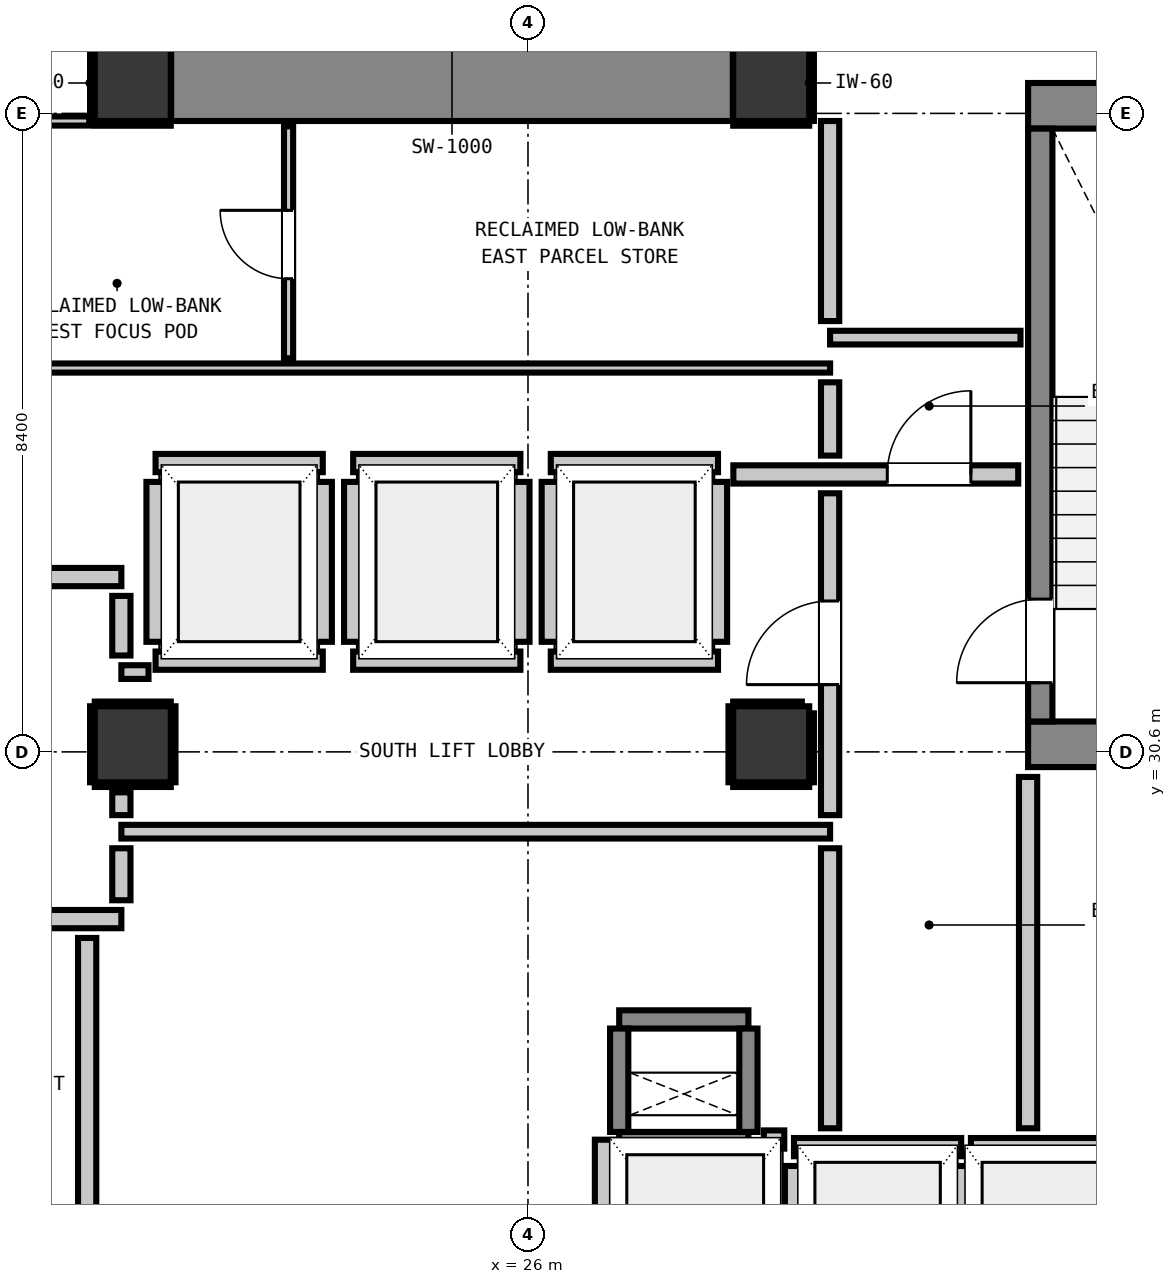
"""IFC4 building model, lengths in metres.
Left out: names, types, materials, properties, quantities, classifications, styles, units other than length and angle.
Written with IfcOpenShell. Run it as: python <this file> out.ifc"""

import sys

from ifc_helpers import new_model, si_unit, direction, frame, frame_2d, origin, origin_2d, place, context, subcontext, project, spatial, rectangle, extrude, element, fill, save


model = new_model("IFC4")
c1 = context("Model", 3, precision=1e-05, world=origin(), true_north=direction((0.0, 1.0)))
c2 = subcontext(c1, "Body", "Model", "MODEL_VIEW")
j1 = project(units=[si_unit("LENGTHUNIT", "METRE"), si_unit("PLANEANGLEUNIT", "RADIAN")], contexts=[c1])
p1 = place(None, origin())
s1 = spatial("IfcSite", under=j1, at=p1, CompositionType="ELEMENT")
p2 = place(p1, origin())
s2 = spatial("IfcBuilding", under=s1, at=p2, CompositionType="ELEMENT")
p3 = place(p2, frame((0.0, 0.0, 102.76)))
s3 = spatial("IfcBuildingStorey", under=s2, at=p3, CompositionType="ELEMENT", Elevation=102.76)
for number, where, z_axis, x_axis in (
    (1, (20.8, 39.4, 0.0), (0.0, 0.0, 1.0), (1.0, 0.0, 0.0)),
    (2, (29.2, 39.4, 0.0), (0.0, 0.0, 1.0), (1.0, 0.0, 0.0)),
):
    element("IfcColumn", number, at=place(p3, frame(where, z_axis=z_axis, x_axis=x_axis)), inside=s3, PredefinedType="COLUMN", context=c2, shape_type="SweptSolid", body=[
        extrude(rectangle(XDim=1.0, YDim=1.0, at=origin_2d()), origin(), (0.0, 0.0, 1.0), 3.32),
    ])
p4 = place(p3, frame((32.58, 39.1, 0.0), z_axis=(0.0, 0.0, 1.0), x_axis=(1.0, 0.0, 0.0)))
e3 = element("IfcWall", 3, at=p4, inside=s3, PredefinedType="SHEAR", context=c2, shape_type="SweptSolid", body=[
    extrude(rectangle(XDim=4.08, YDim=0.6, at=frame_2d((2.04, 0.0))), origin(), (0.0, 0.0, 1.0), 3.32),
])
p5 = place(p3, frame((32.58, 30.7, 0.0), z_axis=(0.0, 0.0, 1.0), x_axis=(1.0, 0.0, 0.0)))
e4 = element("IfcWall", 4, at=p5, inside=s3, PredefinedType="SHEAR", context=c2, shape_type="SweptSolid", body=[
    extrude(rectangle(XDim=3.415, YDim=0.6, at=frame_2d((1.708, 0.0))), origin(), (0.0, 0.0, 1.0), 3.32),
])
p6 = place(p3, frame((21.305, 39.4, 0.0), z_axis=(0.0, 0.0, 1.0), x_axis=(1.0, 0.0, 0.0)))
e5 = element("IfcWall", 5, at=p6, inside=s3, PredefinedType="SHEAR", context=c2, shape_type="SweptSolid", body=[
    extrude(rectangle(XDim=7.39, YDim=1.0, at=frame_2d((3.695, 0.0))), origin(), (0.0, 0.0, 1.0), 3.32),
])
p7 = place(p3, frame((32.74, 31.0, 0.0), z_axis=(0.0, 0.0, 1.0), x_axis=(0.0, 1.0, 0.0)))
e6 = element("IfcWall", 6, at=p7, inside=s3, PredefinedType="SHEAR", context=c2, shape_type="SweptSolid", body=[
    extrude(rectangle(XDim=7.8, YDim=0.32, at=frame_2d((3.9, 0.0))), origin(), (0.0, 0.0, 1.0), 3.32),
])
p8 = place(p7, frame((0.51, 0.0, 0.0)))
e7 = element("IfcOpeningElement", 7, at=p8, cuts=e6, PredefinedType="OPENING", context=c2, shape_type="SweptSolid", body=[
    extrude(rectangle(XDim=1.1, YDim=2.15, at=frame_2d((0.55, 1.075))), frame((0.0, 0.17, 0.0), z_axis=(0.0, -1.0, 0.0), x_axis=(1.0, 0.0, 0.0)), (0.0, 0.0, 1.0), 0.34),
])
for number, where, z_axis, x_axis in (
    (8, (27.2, 25.48, 0.0), (0.0, 0.0, 1.0), (1.0, 0.0, 0.0)),
    (9, (27.2, 27.08, 0.0), (0.0, 0.0, 1.0), (1.0, 0.0, 0.0)),
):
    element("IfcWall", number, at=place(p3, frame(where, z_axis=z_axis, x_axis=x_axis)), inside=s3, PredefinedType="SHEAR", context=c2, shape_type="SweptSolid", body=[
        extrude(rectangle(XDim=1.7, YDim=0.24, at=frame_2d((0.85, 0.0))), origin(), (0.0, 0.0, 1.0), 3.32),
    ])
for number, where, z_axis, x_axis in (
    (10, (27.2, 25.6, 0.0), (0.0, 0.0, 1.0), (0.0, 1.0, 0.0)),
    (11, (28.9, 25.6, 0.0), (0.0, 0.0, 1.0), (0.0, 1.0, 0.0)),
):
    element("IfcWall", number, at=place(p3, frame(where, z_axis=z_axis, x_axis=x_axis)), inside=s3, PredefinedType="SHEAR", context=c2, shape_type="SweptSolid", body=[
        extrude(rectangle(XDim=1.36, YDim=0.24, at=frame_2d((0.68, 0.0))), origin(), (0.0, 0.0, 1.0), 3.32),
    ])
for number, where, z_axis, x_axis in (
    (12, (20.8, 30.7, 0.0), (0.0, 0.0, 1.0), (1.0, 0.0, 0.0)),
    (13, (29.2, 30.7, 0.0), (0.0, 0.0, 1.0), (1.0, 0.0, 0.0)),
):
    element("IfcColumn", number, at=place(p3, frame(where, z_axis=z_axis, x_axis=x_axis)), inside=s3, PredefinedType="COLUMN", context=c2, shape_type="SweptSolid", body=[
        extrude(rectangle(XDim=1.0, YDim=1.0, at=origin_2d()), origin(), (0.0, 0.0, 1.0), 3.32),
    ])
for number, where, z_axis, x_axis in (
    (14, (21.1, 31.8, 0.0), (0.0, 0.0, 1.0), (1.0, 0.0, 0.0)),
    (15, (21.1, 34.4, 0.0), (0.0, 0.0, 1.0), (1.0, 0.0, 0.0)),
):
    element("IfcWall", number, at=place(p3, frame(where, z_axis=z_axis, x_axis=x_axis)), inside=s3, PredefinedType="PARTITIONING", context=c2, shape_type="SweptSolid", body=[
        extrude(rectangle(XDim=2.2, YDim=0.24, at=frame_2d((1.1, 0.0))), origin(), (0.0, 0.0, 1.0), 2.9),
    ])
p9 = place(p3, frame((21.1, 32.048, 0.0), z_axis=(0.0, 0.0, 1.0), x_axis=(0.0, 1.0, 0.0)))
e16 = element("IfcWall", 16, at=p9, inside=s3, PredefinedType="PARTITIONING", context=c2, shape_type="SweptSolid", body=[
    extrude(rectangle(XDim=2.104, YDim=0.24, at=frame_2d((1.052, 0.0))), origin(), (0.0, 0.0, 1.0), 0.905),
])
p10 = place(p3, frame((23.3, 32.048, 0.0), z_axis=(0.0, 0.0, 1.0), x_axis=(0.0, 1.0, 0.0)))
e17 = element("IfcWall", 17, at=p10, inside=s3, PredefinedType="PARTITIONING", context=c2, shape_type="SweptSolid", body=[
    extrude(rectangle(XDim=2.104, YDim=0.24, at=frame_2d((1.052, 0.0))), origin(), (0.0, 0.0, 1.0), 2.9),
])
for number, where, z_axis, x_axis in (
    (18, (23.7, 31.8, 0.0), (0.0, 0.0, 1.0), (1.0, 0.0, 0.0)),
    (19, (23.7, 34.4, 0.0), (0.0, 0.0, 1.0), (1.0, 0.0, 0.0)),
):
    element("IfcWall", number, at=place(p3, frame(where, z_axis=z_axis, x_axis=x_axis)), inside=s3, PredefinedType="PARTITIONING", context=c2, shape_type="SweptSolid", body=[
        extrude(rectangle(XDim=2.2, YDim=0.24, at=frame_2d((1.1, 0.0))), origin(), (0.0, 0.0, 1.0), 2.9),
    ])
for number, where, z_axis, x_axis in (
    (20, (23.7, 32.048, 0.0), (0.0, 0.0, 1.0), (0.0, 1.0, 0.0)),
    (21, (25.9, 32.048, 0.0), (0.0, 0.0, 1.0), (0.0, 1.0, 0.0)),
):
    element("IfcWall", number, at=place(p3, frame(where, z_axis=z_axis, x_axis=x_axis)), inside=s3, PredefinedType="PARTITIONING", context=c2, shape_type="SweptSolid", body=[
        extrude(rectangle(XDim=2.104, YDim=0.24, at=frame_2d((1.052, 0.0))), origin(), (0.0, 0.0, 1.0), 2.9),
    ])
for number, where, z_axis, x_axis in (
    (22, (26.3, 31.8, 0.0), (0.0, 0.0, 1.0), (1.0, 0.0, 0.0)),
    (23, (26.3, 34.4, 0.0), (0.0, 0.0, 1.0), (1.0, 0.0, 0.0)),
):
    element("IfcWall", number, at=place(p3, frame(where, z_axis=z_axis, x_axis=x_axis)), inside=s3, PredefinedType="PARTITIONING", context=c2, shape_type="SweptSolid", body=[
        extrude(rectangle(XDim=2.2, YDim=0.24, at=frame_2d((1.1, 0.0))), origin(), (0.0, 0.0, 1.0), 2.9),
    ])
p11 = place(p3, frame((26.3, 32.048, 0.0), z_axis=(0.0, 0.0, 1.0), x_axis=(0.0, 1.0, 0.0)))
e24 = element("IfcWall", 24, at=p11, inside=s3, PredefinedType="PARTITIONING", context=c2, shape_type="SweptSolid", body=[
    extrude(rectangle(XDim=2.104, YDim=0.24, at=frame_2d((1.052, 0.0))), origin(), (0.0, 0.0, 1.0), 2.9),
])
p12 = place(p3, frame((28.5, 32.048, 0.0), z_axis=(0.0, 0.0, 1.0), x_axis=(0.0, 1.0, 0.0)))
e25 = element("IfcWall", 25, at=p12, inside=s3, PredefinedType="PARTITIONING", context=c2, shape_type="SweptSolid", body=[
    extrude(rectangle(XDim=2.104, YDim=0.24, at=frame_2d((1.052, 0.0))), origin(), (0.0, 0.0, 1.0), 0.905),
])
p13 = place(p3, frame((29.5, 25.4, 0.0), z_axis=(0.0, 0.0, 1.0), x_axis=(1.0, 0.0, 0.0)))
e26 = element("IfcWall", 26, at=p13, inside=s3, PredefinedType="PARTITIONING", context=c2, shape_type="SweptSolid", body=[
    extrude(rectangle(XDim=2.2, YDim=0.24, at=frame_2d((1.1, 0.0))), origin(), (0.0, 0.0, 1.0), 2.9),
])
p14 = place(p3, frame((29.5, 22.632, 0.0), z_axis=(0.0, 0.0, 1.0), x_axis=(0.0, 1.0, 0.0)))
e27 = element("IfcWall", 27, at=p14, inside=s3, PredefinedType="PARTITIONING", context=c2, shape_type="SweptSolid", body=[
    extrude(rectangle(XDim=2.52, YDim=0.24, at=frame_2d((1.26, 0.0))), origin(), (0.0, 0.0, 1.0), 0.905),
])
p15 = place(p3, frame((31.7, 22.63, 0.0), z_axis=(0.0, 0.0, 1.0), x_axis=(0.0, 1.0, 0.0)))
e28 = element("IfcWall", 28, at=p15, inside=s3, PredefinedType="PARTITIONING", context=c2, shape_type="SweptSolid", body=[
    extrude(rectangle(XDim=2.522, YDim=0.24, at=frame_2d((1.261, 0.0))), origin(), (0.0, 0.0, 1.0), 2.9),
])
p16 = place(p3, frame((31.828, 25.4, 0.0), z_axis=(0.0, 0.0, 1.0), x_axis=(1.0, 0.0, 0.0)))
e29 = element("IfcWall", 29, at=p16, inside=s3, PredefinedType="PARTITIONING", context=c2, shape_type="SweptSolid", body=[
    extrude(rectangle(XDim=2.072, YDim=0.24, at=frame_2d((1.036, 0.0))), origin(), (0.0, 0.0, 1.0), 2.9),
])
p17 = place(p3, frame((29.103, 25.5, 0.0), z_axis=(0.0, 0.0, 1.0), x_axis=(1.0, 0.0, 0.0)))
e30 = element("IfcWall", 30, at=p17, inside=s3, PredefinedType="PARTITIONING", context=c2, shape_type="SweptSolid", body=[
    extrude(rectangle(XDim=0.269, YDim=0.24, at=frame_2d((0.135, 0.0))), origin(), (0.0, 0.0, 1.0), 2.9),
])
p18 = place(p3, frame((27.0, 22.63, 0.0), z_axis=(0.0, 0.0, 1.0), x_axis=(0.0, 1.0, 0.0)))
e31 = element("IfcWall", 31, at=p18, inside=s3, PredefinedType="PARTITIONING", context=c2, shape_type="SweptSolid", body=[
    extrude(rectangle(XDim=2.868, YDim=0.24, at=frame_2d((1.434, 0.0))), origin(), (0.0, 0.0, 1.0), 2.9),
])
p19 = place(p3, frame((17.45, 28.4, 0.0), z_axis=(0.0, 0.0, 1.0), x_axis=(1.0, 0.0, 0.0)))
e32 = element("IfcWall", 32, at=p19, inside=s3, PredefinedType="PARTITIONING", context=c2, shape_type="SweptSolid", body=[
    extrude(rectangle(XDim=3.2, YDim=0.24, at=frame_2d((1.6, 0.0))), origin(), (0.0, 0.0, 1.0), 2.9),
])
p20 = place(p19, frame((0.784, 0.0, 0.0)))
e33 = element("IfcOpeningElement", 33, at=p20, cuts=e32, PredefinedType="OPENING", context=c2, shape_type="SweptSolid", body=[
    extrude(rectangle(XDim=1.1, YDim=2.15, at=frame_2d((0.55, 1.075))), frame((0.0, 0.13, 0.0), z_axis=(0.0, -1.0, 0.0), x_axis=(1.0, 0.0, 0.0)), (0.0, 0.0, 1.0), 0.26),
])
p21 = place(p3, frame((17.45, 32.9, 0.0), z_axis=(0.0, 0.0, 1.0), x_axis=(1.0, 0.0, 0.0)))
e34 = element("IfcWall", 34, at=p21, inside=s3, PredefinedType="PARTITIONING", context=c2, shape_type="SweptSolid", body=[
    extrude(rectangle(XDim=3.2, YDim=0.24, at=frame_2d((1.6, 0.0))), origin(), (0.0, 0.0, 1.0), 2.9),
])
p22 = place(p21, frame((0.159, 0.0, 0.0)))
e35 = element("IfcOpeningElement", 35, at=p22, cuts=e34, PredefinedType="OPENING", context=c2, shape_type="SweptSolid", body=[
    extrude(rectangle(XDim=1.1, YDim=2.15, at=frame_2d((0.55, 1.075))), frame((0.0, 0.13, 0.0), z_axis=(0.0, -1.0, 0.0), x_axis=(1.0, 0.0, 0.0)), (0.0, 0.0, 1.0), 0.26),
])
p23 = place(p3, frame((28.702, 34.25, 0.0), z_axis=(0.0, 0.0, 1.0), x_axis=(1.0, 0.0, 0.0)))
e36 = element("IfcWall", 36, at=p23, inside=s3, PredefinedType="PARTITIONING", context=c2, shape_type="SweptSolid", body=[
    extrude(rectangle(XDim=3.748, YDim=0.24, at=frame_2d((1.874, 0.0))), origin(), (0.0, 0.0, 1.0), 2.9),
])
p24 = place(p23, frame((2.025, 0.0, 0.0)))
e37 = element("IfcOpeningElement", 37, at=p24, cuts=e36, PredefinedType="OPENING", context=c2, shape_type="SweptSolid", body=[
    extrude(rectangle(XDim=1.1, YDim=2.15, at=frame_2d((0.55, 1.075))), frame((0.0, 0.13, 0.0), z_axis=(0.0, -1.0, 0.0), x_axis=(1.0, 0.0, 0.0)), (0.0, 0.0, 1.0), 0.26),
])
p25 = place(p3, frame((20.65, 29.55, 0.0), z_axis=(0.0, 0.0, 1.0), x_axis=(1.0, 0.0, 0.0)))
e38 = element("IfcWall", 38, at=p25, inside=s3, PredefinedType="PARTITIONING", context=c2, shape_type="SweptSolid", body=[
    extrude(rectangle(XDim=9.325, YDim=0.18, at=frame_2d((4.663, 0.0))), origin(), (0.0, 0.0, 1.0), 2.9),
])
p26 = place(p3, frame((20.65, 31.65, 0.0), z_axis=(0.0, 0.0, 1.0), x_axis=(1.0, 0.0, 0.0)))
e39 = element("IfcWall", 39, at=p26, inside=s3, PredefinedType="PARTITIONING", context=c2, shape_type="SweptSolid", body=[
    extrude(rectangle(XDim=0.357, YDim=0.18, at=frame_2d((0.179, 0.0))), origin(), (0.0, 0.0, 1.0), 2.9),
])
p27 = place(p3, frame((29.975, 36.05, 0.0), z_axis=(0.0, 0.0, 1.0), x_axis=(1.0, 0.0, 0.0)))
e40 = element("IfcWall", 40, at=p27, inside=s3, PredefinedType="PARTITIONING", context=c2, shape_type="SweptSolid", body=[
    extrude(rectangle(XDim=2.505, YDim=0.18, at=frame_2d((1.252, 0.0))), origin(), (0.0, 0.0, 1.0), 2.9),
])
p28 = place(p3, frame((18.95, 35.65, 0.0), z_axis=(0.0, 0.0, 1.0), x_axis=(1.0, 0.0, 0.0)))
e41 = element("IfcWall", 41, at=p28, inside=s3, PredefinedType="PARTITIONING", context=c2, shape_type="SweptSolid", body=[
    extrude(rectangle(XDim=11.025, YDim=0.12, at=frame_2d((5.513, 0.0))), origin(), (0.0, 0.0, 1.0), 2.9),
])
p29 = place(p3, frame((18.95, 38.9, 0.0), z_axis=(0.0, 0.0, 1.0), x_axis=(1.0, 0.0, 0.0)))
e42 = element("IfcWall", 42, at=p29, inside=s3, PredefinedType="PARTITIONING", context=c2, shape_type="SweptSolid", body=[
    extrude(rectangle(XDim=1.278, YDim=0.12, at=frame_2d((0.639, 0.0))), origin(), (0.0, 0.0, 1.0), 0.905),
])
p30 = place(p3, frame((20.2, 22.586, 0.0), z_axis=(0.0, 0.0, 1.0), x_axis=(0.0, 1.0, 0.0)))
e43 = element("IfcWall", 43, at=p30, inside=s3, PredefinedType="PARTITIONING", context=c2, shape_type="SweptSolid", body=[
    extrude(rectangle(XDim=5.566, YDim=0.24, at=frame_2d((2.783, 0.0))), origin(), (0.0, 0.0, 1.0), 0.905),
])
p31 = place(p3, frame((20.65, 28.648, 0.0), z_axis=(0.0, 0.0, 1.0), x_axis=(0.0, 1.0, 0.0)))
e44 = element("IfcWall", 44, at=p31, inside=s3, PredefinedType="PARTITIONING", context=c2, shape_type="SweptSolid", body=[
    extrude(rectangle(XDim=0.684, YDim=0.24, at=frame_2d((0.342, 0.0))), origin(), (0.0, 0.0, 1.0), 0.905),
])
p32 = place(p3, frame((20.65, 29.768, 0.0), z_axis=(0.0, 0.0, 1.0), x_axis=(0.0, 1.0, 0.0)))
e45 = element("IfcWall", 45, at=p32, inside=s3, PredefinedType="PARTITIONING", context=c2, shape_type="SweptSolid", body=[
    extrude(rectangle(XDim=0.3, YDim=0.24, at=frame_2d((0.15, 0.0))), origin(), (0.0, 0.0, 1.0), 0.905),
])
p33 = place(p3, frame((20.65, 31.868, 0.0), z_axis=(0.0, 0.0, 1.0), x_axis=(0.0, 1.0, 0.0)))
e46 = element("IfcWall", 46, at=p33, inside=s3, PredefinedType="PARTITIONING", context=c2, shape_type="SweptSolid", body=[
    extrude(rectangle(XDim=0.784, YDim=0.24, at=frame_2d((0.392, 0.0))), origin(), (0.0, 0.0, 1.0), 0.905),
])
p34 = place(p3, frame((29.975, 25.648, 0.0), z_axis=(0.0, 0.0, 1.0), x_axis=(0.0, 1.0, 0.0)))
e47 = element("IfcWall", 47, at=p34, inside=s3, PredefinedType="PARTITIONING", context=c2, shape_type="SweptSolid", body=[
    extrude(rectangle(XDim=3.684, YDim=0.24, at=frame_2d((1.842, 0.0))), origin(), (0.0, 0.0, 1.0), 2.9),
])
p35 = place(p3, frame((29.975, 29.768, 0.0), z_axis=(0.0, 0.0, 1.0), x_axis=(0.0, 1.0, 0.0)))
e48 = element("IfcWall", 48, at=p35, inside=s3, PredefinedType="PARTITIONING", context=c2, shape_type="SweptSolid", body=[
    extrude(rectangle(XDim=4.234, YDim=0.24, at=frame_2d((2.117, 0.0))), origin(), (0.0, 0.0, 1.0), 2.9),
])
p36 = place(p35, frame((1.717, 0.0, 0.0)))
e49 = element("IfcOpeningElement", 49, at=p36, cuts=e48, PredefinedType="OPENING", context=c2, shape_type="SweptSolid", body=[
    extrude(rectangle(XDim=1.1, YDim=2.15, at=frame_2d((0.55, 1.075))), frame((0.0, 0.13, 0.0), z_axis=(0.0, -1.0, 0.0), x_axis=(1.0, 0.0, 0.0)), (0.0, 0.0, 1.0), 0.26),
])
p37 = place(p3, frame((29.975, 34.498, 0.0), z_axis=(0.0, 0.0, 1.0), x_axis=(0.0, 1.0, 0.0)))
e50 = element("IfcWall", 50, at=p37, inside=s3, PredefinedType="PARTITIONING", context=c2, shape_type="SweptSolid", body=[
    extrude(rectangle(XDim=0.964, YDim=0.24, at=frame_2d((0.482, 0.0))), origin(), (0.0, 0.0, 1.0), 2.9),
])
p38 = place(p3, frame((29.975, 36.268, 0.0), z_axis=(0.0, 0.0, 1.0), x_axis=(0.0, 1.0, 0.0)))
e51 = element("IfcWall", 51, at=p38, inside=s3, PredefinedType="PARTITIONING", context=c2, shape_type="SweptSolid", body=[
    extrude(rectangle(XDim=2.632, YDim=0.24, at=frame_2d((1.316, 0.0))), origin(), (0.0, 0.0, 1.0), 2.9),
])
p39 = place(p3, frame((32.58, 25.648, 0.0), z_axis=(0.0, 0.0, 1.0), x_axis=(0.0, 1.0, 0.0)))
e52 = element("IfcWall", 52, at=p39, inside=s3, PredefinedType="PARTITIONING", context=c2, shape_type="SweptSolid", body=[
    extrude(rectangle(XDim=4.622, YDim=0.24, at=frame_2d((2.311, 0.0))), origin(), (0.0, 0.0, 1.0), 2.9),
])
p40 = place(p3, frame((22.85, 35.778, 0.0), z_axis=(0.0, 0.0, 1.0), x_axis=(0.0, 1.0, 0.0)))
e53 = element("IfcWall", 53, at=p40, inside=s3, PredefinedType="PARTITIONING", context=c2, shape_type="SweptSolid", body=[
    extrude(rectangle(XDim=3.052, YDim=0.12, at=frame_2d((1.526, 0.0))), origin(), (0.0, 0.0, 1.0), 2.9),
])
p41 = place(p40, frame((1.047, 0.0, 0.0)))
e54 = element("IfcOpeningElement", 54, at=p41, cuts=e53, PredefinedType="OPENING", context=c2, shape_type="SweptSolid", body=[
    extrude(rectangle(XDim=0.9, YDim=2.1, at=frame_2d((0.45, 1.05))), frame((0.0, 0.07, 0.0), z_axis=(0.0, -1.0, 0.0), x_axis=(1.0, 0.0, 0.0)), (0.0, 0.0, 1.0), 0.14),
])
for number, where, z_axis, x_axis in (
    (55, (20.3, 38.868, 0.0), (0.0, 0.0, 1.0), (1.0, 0.0, 0.0)),
    (56, (20.268, 38.9, 0.0), (0.0, 0.0, 1.0), (0.0, 1.0, 0.0)),
    (57, (28.7, 38.868, 0.0), (0.0, 0.0, 1.0), (1.0, 0.0, 0.0)),
    (58, (29.732, 38.9, 0.0), (0.0, 0.0, 1.0), (0.0, 1.0, 0.0)),
    (59, (20.3, 30.168, 0.0), (0.0, 0.0, 1.0), (1.0, 0.0, 0.0)),
    (60, (20.3, 31.232, 0.0), (0.0, 0.0, 1.0), (1.0, 0.0, 0.0)),
    (61, (20.268, 30.2, 0.0), (0.0, 0.0, 1.0), (0.0, 1.0, 0.0)),
    (62, (21.332, 30.2, 0.0), (0.0, 0.0, 1.0), (0.0, 1.0, 0.0)),
    (63, (28.7, 30.168, 0.0), (0.0, 0.0, 1.0), (1.0, 0.0, 0.0)),
):
    element("IfcWall", number, at=place(p3, frame(where, z_axis=z_axis, x_axis=x_axis)), inside=s3, PredefinedType="PARTITIONING", context=c2, shape_type="SweptSolid", body=[
        extrude(rectangle(XDim=1.0, YDim=0.06, at=frame_2d((0.5, 0.0))), origin(), (0.0, 0.0, 1.0), 0.905),
    ])
p42 = place(p3, frame((28.7, 31.232, 0.0), z_axis=(0.0, 0.0, 1.0), x_axis=(1.0, 0.0, 0.0)))
e64 = element("IfcWall", 64, at=p42, inside=s3, PredefinedType="PARTITIONING", context=c2, shape_type="SweptSolid", body=[
    extrude(rectangle(XDim=0.903, YDim=0.06, at=frame_2d((0.452, 0.0))), origin(), (0.0, 0.0, 1.0), 0.905),
])
p43 = place(p3, frame((28.668, 30.2, 0.0), z_axis=(0.0, 0.0, 1.0), x_axis=(0.0, 1.0, 0.0)))
e65 = element("IfcWall", 65, at=p43, inside=s3, PredefinedType="PARTITIONING", context=c2, shape_type="SweptSolid", body=[
    extrude(rectangle(XDim=1.0, YDim=0.06, at=frame_2d((0.5, 0.0))), origin(), (0.0, 0.0, 1.0), 0.905),
])
p44 = place(p3, frame((29.732, 30.2, 0.0), z_axis=(0.0, 0.0, 1.0), x_axis=(0.0, 1.0, 0.0)))
e66 = element("IfcWall", 66, at=p44, inside=s3, PredefinedType="PARTITIONING", context=c2, shape_type="SweptSolid", body=[
    extrude(rectangle(XDim=0.907, YDim=0.06, at=frame_2d((0.454, 0.0))), origin(), (0.0, 0.0, 1.0), 0.905),
])
p45 = place(p8, origin())
e67 = element("IfcDoor", 67, at=p45, inside=s3, OperationType="SINGLE_SWING_LEFT", PredefinedType="DOOR", context=c2, shape_type="SweptSolid", body=[
    extrude(rectangle(XDim=1.1, YDim=2.15, at=frame_2d((0.55, 1.075))), frame((0.0, 0.025, 0.0), z_axis=(0.0, -1.0, 0.0), x_axis=(1.0, 0.0, 0.0)), (0.0, 0.0, 1.0), 0.05),
])
fill(e7, e67)
p46 = place(p36, origin())
e68 = element("IfcDoor", 68, at=p46, inside=s3, OperationType="SINGLE_SWING_LEFT", PredefinedType="DOOR", context=c2, shape_type="SweptSolid", body=[
    extrude(rectangle(XDim=1.1, YDim=2.15, at=frame_2d((0.55, 1.075))), frame((0.0, 0.025, 0.0), z_axis=(0.0, -1.0, 0.0), x_axis=(1.0, 0.0, 0.0)), (0.0, 0.0, 1.0), 0.05),
])
fill(e49, e68)
p47 = place(p24, origin())
e69 = element("IfcDoor", 69, at=p47, inside=s3, OperationType="SINGLE_SWING_RIGHT", PredefinedType="DOOR", context=c2, shape_type="SweptSolid", body=[
    extrude(rectangle(XDim=1.1, YDim=2.15, at=frame_2d((0.55, 1.075))), frame((0.0, 0.025, 0.0), z_axis=(0.0, -1.0, 0.0), x_axis=(1.0, 0.0, 0.0)), (0.0, 0.0, 1.0), 0.05),
])
fill(e37, e69)
p48 = place(p41, origin())
e70 = element("IfcDoor", 70, at=p48, inside=s3, OperationType="SINGLE_SWING_RIGHT", PredefinedType="DOOR", context=c2, shape_type="SweptSolid", body=[
    extrude(rectangle(XDim=0.9, YDim=2.1, at=frame_2d((0.45, 1.05))), frame((0.0, 0.025, 0.0), z_axis=(0.0, -1.0, 0.0), x_axis=(1.0, 0.0, 0.0)), (0.0, 0.0, 1.0), 0.05),
])
fill(e54, e70)
save(model, sys.argv[1])
